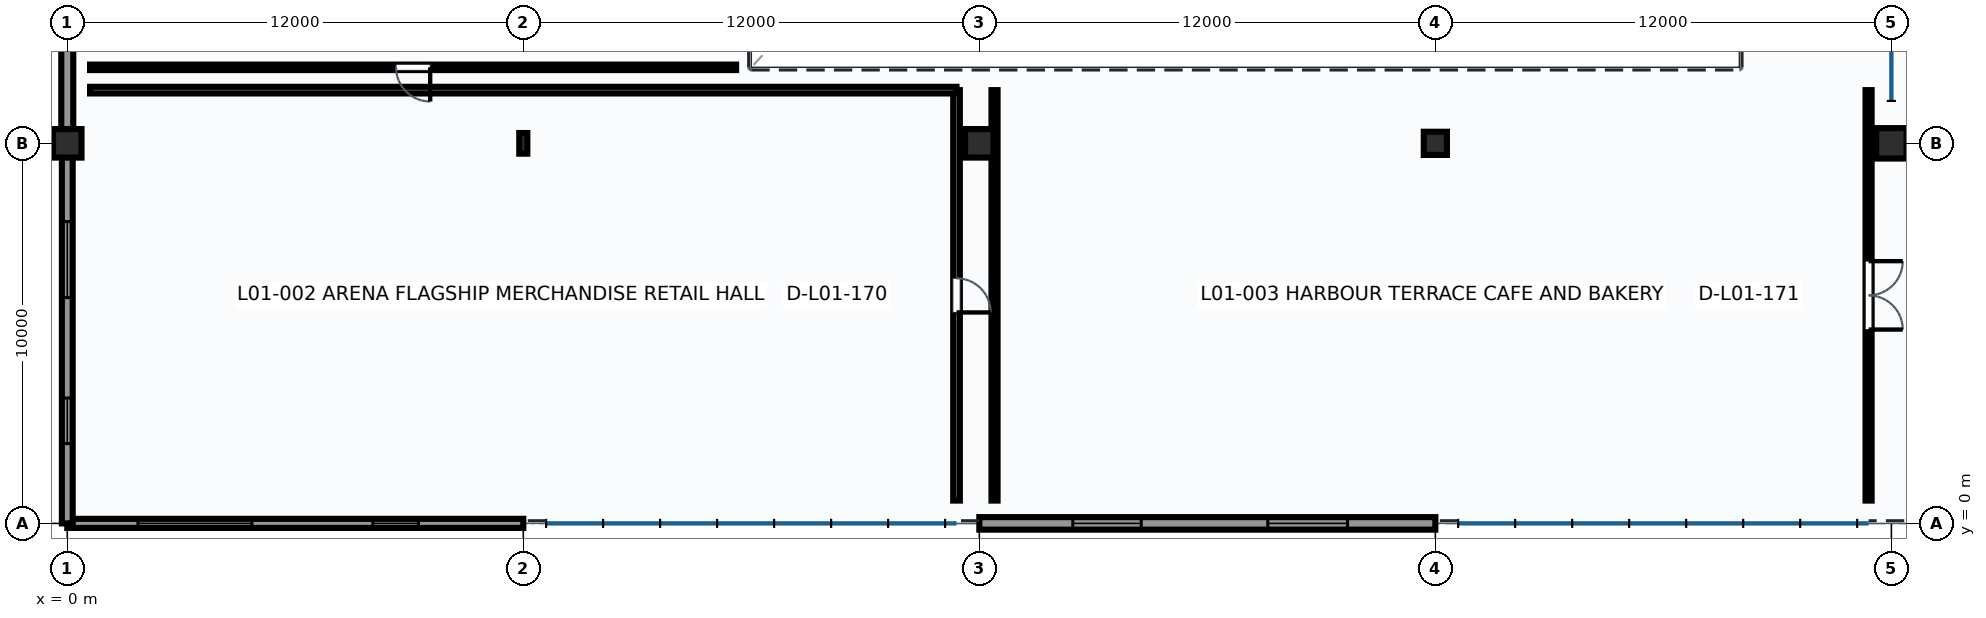
"""IFC4 building model, lengths in metres.
Left out: names, types, materials, properties, quantities, classifications, styles, units other than length and angle.
Written with IfcOpenShell. Run it as: python <this file> out.ifc"""

import sys

from ifc_helpers import new_model, si_unit, direction, frame, frame_2d, origin, origin_with_axes, origin_2d, place, context, subcontext, project, spatial, rectangle, hollow_circle, i_section, extrude, element, fill, save


model = new_model("IFC4")
c1 = context("Model", 3, precision=1e-05, world=origin(), true_north=direction((0.0, 1.0)))
c2 = subcontext(c1, "Body", "Model", "MODEL_VIEW")
j1 = project(units=[si_unit("LENGTHUNIT", "METRE"), si_unit("PLANEANGLEUNIT", "RADIAN")], contexts=[c1])
p1 = place(None, origin())
s1 = spatial("IfcSite", under=j1, at=p1, CompositionType="ELEMENT")
p2 = place(p1, origin())
s2 = spatial("IfcBuilding", under=s1, at=p2, CompositionType="ELEMENT")
p3 = place(p2, frame((0.0, 0.0, 5.4)))
s3 = spatial("IfcBuildingStorey", under=s2, at=p3, CompositionType="ELEMENT", Elevation=5.4)
p4 = place(p3, frame((0.0, 10.0, 0.0), z_axis=(0.0, 0.0, 1.0), x_axis=(1.0, 0.0, 0.0)))
e1 = element("IfcColumn", 1, at=p4, inside=s3, PredefinedType="COLUMN", context=c2, shape_type="SweptSolid", body=[
    extrude(rectangle(XDim=0.75, YDim=0.75, at=origin_2d()), origin(), (0.0, 0.0, 1.0), 4.8),
])
p5 = place(p3, frame((12.0, 10.0, 0.0), z_axis=(0.0, 0.0, 1.0), x_axis=(1.0, 0.0, 0.0)))
e2 = element("IfcColumn", 2, at=p5, inside=s3, PredefinedType="COLUMN", context=c2, shape_type="SweptSolid", body=[
    extrude(i_section(OverallWidth=0.212, OverallDepth=0.544, WebThickness=0.013, FlangeThickness=0.021, FilletRadius=0.016, at=origin_2d()), origin(), (0.0, 0.0, 1.0), 4.8),
])
p6 = place(p3, frame((24.0, 10.0, 0.0), z_axis=(0.0, 0.0, 1.0), x_axis=(1.0, 0.0, 0.0)))
e3 = element("IfcColumn", 3, at=p6, inside=s3, PredefinedType="COLUMN", context=c2, shape_type="SweptSolid", body=[
    extrude(rectangle(XDim=0.75, YDim=0.75, at=origin_2d()), origin(), (0.0, 0.0, 1.0), 4.8),
])
p7 = place(p3, frame((36.0, 10.0, 0.0), z_axis=(0.0, 0.0, 1.0), x_axis=(1.0, 0.0, 0.0)))
e4 = element("IfcColumn", 4, at=p7, inside=s3, PredefinedType="COLUMN", context=c2, shape_type="SweptSolid", body=[
    extrude(hollow_circle(Radius=0.305, WallThickness=0.025, at=origin_2d()), origin(), (0.0, 0.0, 1.0), 4.8),
])
p8 = place(p3, frame((48.0, 10.0, 0.0), z_axis=(0.0, 0.0, 1.0), x_axis=(1.0, 0.0, 0.0)))
e5 = element("IfcColumn", 5, at=p8, inside=s3, PredefinedType="COLUMN", context=c2, shape_type="SweptSolid", body=[
    extrude(rectangle(XDim=0.8, YDim=0.8, at=origin_2d()), origin(), (0.0, 0.0, 1.0), 4.8),
])
p9 = place(p3, frame((24.0, 0.0, 0.0), z_axis=(0.0, 0.0, 1.0), x_axis=(1.0, 0.0, 0.0)))
e6 = element("IfcWall", 6, at=p9, inside=s3, PredefinedType="SOLIDWALL", context=c2, shape_type="SweptSolid", body=[
    extrude(rectangle(XDim=12.0, YDim=0.33, at=frame_2d((6.0, 0.0))), origin(), (0.0, 0.0, 1.0), 4.47),
])
p10 = place(p9, frame((2.46, 0.0, 0.9)))
e7 = element("IfcOpeningElement", 7, at=p10, cuts=e6, PredefinedType="OPENING", context=c2, shape_type="SweptSolid", body=[
    extrude(rectangle(XDim=1.8, YDim=1.8, at=frame_2d((0.9, 0.9))), frame((0.0, 0.175, 0.0), z_axis=(0.0, -1.0, 0.0), x_axis=(1.0, 0.0, 0.0)), (0.0, 0.0, 1.0), 0.35),
])
p11 = place(p9, frame((7.59, 0.0, 0.9)))
e8 = element("IfcOpeningElement", 8, at=p11, cuts=e6, PredefinedType="OPENING", context=c2, shape_type="SweptSolid", body=[
    extrude(rectangle(XDim=2.1, YDim=1.8, at=frame_2d((1.05, 0.9))), frame((0.0, 0.175, 0.0), z_axis=(0.0, -1.0, 0.0), x_axis=(1.0, 0.0, 0.0)), (0.0, 0.0, 1.0), 0.35),
])
p12 = place(p3, origin_with_axes())
e9 = element("IfcWall", 9, at=p12, inside=s3, PredefinedType="SOLIDWALL", context=c2, shape_type="SweptSolid", body=[
    extrude(rectangle(XDim=12.0, YDim=0.24, at=frame_2d((6.0, 0.0))), origin(), (0.0, 0.0, 1.0), 4.47),
])
p13 = place(p12, frame((1.86, 0.0, 0.9)))
e10 = element("IfcOpeningElement", 10, at=p13, cuts=e9, PredefinedType="OPENING", context=c2, shape_type="SweptSolid", body=[
    extrude(rectangle(XDim=3.0, YDim=2.1, at=frame_2d((1.5, 1.05))), frame((0.0, 0.13, 0.0), z_axis=(0.0, -1.0, 0.0), x_axis=(1.0, 0.0, 0.0)), (0.0, 0.0, 1.0), 0.26),
])
p14 = place(p12, frame((8.04, 0.0, 0.9)))
e11 = element("IfcOpeningElement", 11, at=p14, cuts=e9, PredefinedType="OPENING", context=c2, shape_type="SweptSolid", body=[
    extrude(rectangle(XDim=1.2, YDim=1.5, at=frame_2d((0.6, 0.75))), frame((0.0, 0.13, 0.0), z_axis=(0.0, -1.0, 0.0), x_axis=(1.0, 0.0, 0.0)), (0.0, 0.0, 1.0), 0.26),
])
p15 = place(p3, frame((0.0, 0.0, 0.0), z_axis=(0.0, 0.0, 1.0), x_axis=(0.0, 1.0, 0.0)))
e12 = element("IfcWall", 12, at=p15, inside=s3, PredefinedType="SOLIDWALL", context=c2, shape_type="SweptSolid", body=[
    extrude(rectangle(XDim=9.64, YDim=0.285, at=frame_2d((4.82, 0.0))), origin(), (0.0, 0.0, 1.0), 4.47),
])
p16 = place(p15, frame((2.099, 0.0, 0.9)))
e13 = element("IfcOpeningElement", 13, at=p16, cuts=e12, PredefinedType="OPENING", context=c2, shape_type="SweptSolid", body=[
    extrude(rectangle(XDim=1.2, YDim=1.8, at=frame_2d((0.6, 0.9))), frame((0.0, 0.152, 0.0), z_axis=(0.0, -1.0, 0.0), x_axis=(1.0, 0.0, 0.0)), (0.0, 0.0, 1.0), 0.305),
])
p17 = place(p15, frame((5.941, 0.0, 0.9)))
e14 = element("IfcOpeningElement", 14, at=p17, cuts=e12, PredefinedType="OPENING", context=c2, shape_type="SweptSolid", body=[
    extrude(rectangle(XDim=2.0, YDim=1.6, at=frame_2d((1.0, 0.8))), frame((0.0, 0.152, 0.0), z_axis=(0.0, -1.0, 0.0), x_axis=(1.0, 0.0, 0.0)), (0.0, 0.0, 1.0), 0.305),
])
p18 = place(p3, frame((0.0, 10.36, 0.0), z_axis=(0.0, 0.0, 1.0), x_axis=(0.0, 1.0, 0.0)))
e15 = element("IfcWall", 15, at=p18, inside=s3, PredefinedType="SOLIDWALL", context=c2, shape_type="SweptSolid", body=[
    extrude(rectangle(XDim=9.35, YDim=0.315, at=frame_2d((4.675, 0.0))), origin(), (0.0, 0.0, 1.0), 3.757),
])
p19 = place(p3, frame((23.4, 11.4, 0.0), z_axis=(0.0, 0.0, 1.0), x_axis=(0.0, -1.0, 0.0)))
e16 = element("IfcWall", 16, at=p19, inside=s3, PredefinedType="PARTITIONING", context=c2, shape_type="SweptSolid", body=[
    extrude(rectangle(XDim=10.8, YDim=0.175, at=frame_2d((5.4, 0.0))), origin(), (0.0, 0.0, 1.0), 3.984),
])
p20 = place(p19, frame((4.95, 0.0, 0.0)))
e17 = element("IfcOpeningElement", 17, at=p20, cuts=e16, PredefinedType="OPENING", context=c2, shape_type="SweptSolid", body=[
    extrude(rectangle(XDim=0.9, YDim=2.1, at=frame_2d((0.45, 1.05))), frame((0.0, 0.097, 0.0), z_axis=(0.0, -1.0, 0.0), x_axis=(1.0, 0.0, 0.0)), (0.0, 0.0, 1.0), 0.195),
])
p21 = place(p3, frame((0.6, 11.4, 0.0), z_axis=(0.0, 0.0, 1.0), x_axis=(1.0, 0.0, 0.0)))
e18 = element("IfcWall", 18, at=p21, inside=s3, PredefinedType="PARTITIONING", context=c2, shape_type="SweptSolid", body=[
    extrude(rectangle(XDim=22.8, YDim=0.175, at=frame_2d((11.4, 0.0))), origin(), (0.0, 0.0, 1.0), 3.834),
])
p22 = place(p3, frame((47.4, 11.4, 0.0), z_axis=(0.0, 0.0, 1.0), x_axis=(0.0, -1.0, 0.0)))
e19 = element("IfcWall", 19, at=p22, inside=s3, PredefinedType="PARTITIONING", context=c2, shape_type="SweptSolid", body=[
    extrude(rectangle(XDim=10.8, YDim=0.16, at=frame_2d((5.4, 0.0))), origin(), (0.0, 0.0, 1.0), 3.906),
])
p23 = place(p22, frame((4.5, 0.0, 0.0)))
e20 = element("IfcOpeningElement", 20, at=p23, cuts=e19, PredefinedType="OPENING", context=c2, shape_type="SweptSolid", body=[
    extrude(rectangle(XDim=1.8, YDim=2.3, at=frame_2d((0.9, 1.15))), frame((0.0, 0.09, 0.0), z_axis=(0.0, -1.0, 0.0), x_axis=(1.0, 0.0, 0.0)), (0.0, 0.0, 1.0), 0.18),
])
p24 = place(p3, frame((24.4, 0.6, 0.0), z_axis=(0.0, 0.0, 1.0), x_axis=(0.0, 1.0, 0.0)))
e21 = element("IfcWall", 21, at=p24, inside=s3, PredefinedType="PARTITIONING", context=c2, shape_type="SweptSolid", body=[
    extrude(rectangle(XDim=10.8, YDim=0.16, at=frame_2d((5.4, 0.0))), origin(), (0.0, 0.0, 1.0), 3.757),
])
p25 = place(p3, frame((17.6, 12.0, 0.0), z_axis=(0.0, 0.0, 1.0), x_axis=(-1.0, 0.0, 0.0)))
e22 = element("IfcWall", 22, at=p25, inside=s3, PredefinedType="PARTITIONING", context=c2, shape_type="SweptSolid", body=[
    extrude(rectangle(XDim=17.0, YDim=0.145, at=frame_2d((8.5, 0.0))), origin(), (0.0, 0.0, 1.0), 3.834),
])
p26 = place(p25, frame((8.05, 0.0, 0.0)))
e23 = element("IfcOpeningElement", 23, at=p26, cuts=e22, PredefinedType="OPENING", context=c2, shape_type="SweptSolid", body=[
    extrude(rectangle(XDim=0.9, YDim=2.1, at=frame_2d((0.45, 1.05))), frame((0.0, 0.083, 0.0), z_axis=(0.0, -1.0, 0.0), x_axis=(1.0, 0.0, 0.0)), (0.0, 0.0, 1.0), 0.165),
])
p27 = place(p10, origin())
e24 = element("IfcWindow", 24, at=p27, inside=s3, PartitioningType="SINGLE_PANEL", PredefinedType="WINDOW", context=c2, shape_type="SweptSolid", body=[
    extrude(rectangle(XDim=1.8, YDim=1.8, at=frame_2d((0.9, 0.9))), frame((0.0, 0.03, 0.0), z_axis=(0.0, -1.0, 0.0), x_axis=(1.0, 0.0, 0.0)), (0.0, 0.0, 1.0), 0.06),
])
fill(e7, e24)
p28 = place(p11, origin())
e25 = element("IfcWindow", 25, at=p28, inside=s3, PartitioningType="SINGLE_PANEL", PredefinedType="WINDOW", context=c2, shape_type="SweptSolid", body=[
    extrude(rectangle(XDim=2.1, YDim=1.8, at=frame_2d((1.05, 0.9))), frame((0.0, 0.03, 0.0), z_axis=(0.0, -1.0, 0.0), x_axis=(1.0, 0.0, 0.0)), (0.0, 0.0, 1.0), 0.06),
])
fill(e8, e25)
p29 = place(p13, origin())
e26 = element("IfcWindow", 26, at=p29, inside=s3, PartitioningType="SINGLE_PANEL", PredefinedType="WINDOW", context=c2, shape_type="SweptSolid", body=[
    extrude(rectangle(XDim=3.0, YDim=2.1, at=frame_2d((1.5, 1.05))), frame((0.0, 0.03, 0.0), z_axis=(0.0, -1.0, 0.0), x_axis=(1.0, 0.0, 0.0)), (0.0, 0.0, 1.0), 0.06),
])
fill(e10, e26)
p30 = place(p14, origin())
e27 = element("IfcWindow", 27, at=p30, inside=s3, PartitioningType="SINGLE_PANEL", PredefinedType="WINDOW", context=c2, shape_type="SweptSolid", body=[
    extrude(rectangle(XDim=1.2, YDim=1.5, at=frame_2d((0.6, 0.75))), frame((0.0, 0.03, 0.0), z_axis=(0.0, -1.0, 0.0), x_axis=(1.0, 0.0, 0.0)), (0.0, 0.0, 1.0), 0.06),
])
fill(e11, e27)
p31 = place(p16, origin())
e28 = element("IfcWindow", 28, at=p31, inside=s3, PartitioningType="SINGLE_PANEL", PredefinedType="WINDOW", context=c2, shape_type="SweptSolid", body=[
    extrude(rectangle(XDim=1.2, YDim=1.8, at=frame_2d((0.6, 0.9))), frame((0.0, 0.03, 0.0), z_axis=(0.0, -1.0, 0.0), x_axis=(1.0, 0.0, 0.0)), (0.0, 0.0, 1.0), 0.06),
])
fill(e13, e28)
p32 = place(p17, origin())
e29 = element("IfcWindow", 29, at=p32, inside=s3, PartitioningType="SINGLE_PANEL", PredefinedType="WINDOW", context=c2, shape_type="SweptSolid", body=[
    extrude(rectangle(XDim=2.0, YDim=1.6, at=frame_2d((1.0, 0.8))), frame((0.0, 0.03, 0.0), z_axis=(0.0, -1.0, 0.0), x_axis=(1.0, 0.0, 0.0)), (0.0, 0.0, 1.0), 0.06),
])
fill(e14, e29)
p33 = place(p20, origin())
e30 = element("IfcDoor", 30, at=p33, inside=s3, OperationType="SINGLE_SWING_RIGHT", PredefinedType="DOOR", context=c2, shape_type="SweptSolid", body=[
    extrude(rectangle(XDim=0.9, YDim=2.1, at=frame_2d((0.45, 1.05))), frame((0.0, 0.025, 0.0), z_axis=(0.0, -1.0, 0.0), x_axis=(1.0, 0.0, 0.0)), (0.0, 0.0, 1.0), 0.05),
])
fill(e17, e30)
p34 = place(p23, origin())
e31 = element("IfcDoor", 31, at=p34, inside=s3, OperationType="DOUBLE_DOOR_SINGLE_SWING", PredefinedType="DOOR", context=c2, shape_type="SweptSolid", body=[
    extrude(rectangle(XDim=1.8, YDim=2.3, at=frame_2d((0.9, 1.15))), frame((0.0, 0.025, 0.0), z_axis=(0.0, -1.0, 0.0), x_axis=(1.0, 0.0, 0.0)), (0.0, 0.0, 1.0), 0.05),
])
fill(e20, e31)
p35 = place(p26, origin())
e32 = element("IfcDoor", 32, at=p35, inside=s3, OperationType="SINGLE_SWING_LEFT", PredefinedType="DOOR", context=c2, shape_type="SweptSolid", body=[
    extrude(rectangle(XDim=0.9, YDim=2.1, at=frame_2d((0.45, 1.05))), frame((0.0, 0.025, 0.0), z_axis=(0.0, -1.0, 0.0), x_axis=(1.0, 0.0, 0.0)), (0.0, 0.0, 1.0), 0.05),
])
fill(e23, e32)
save(model, sys.argv[1])
